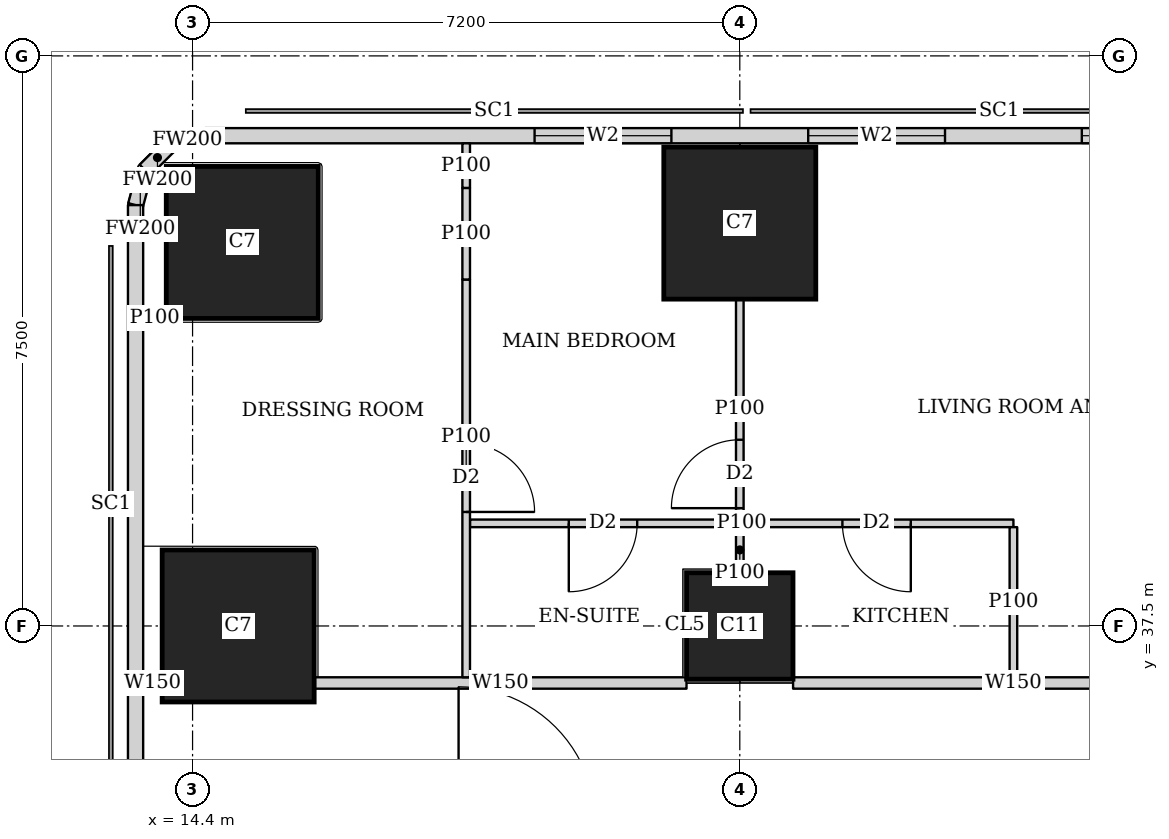
"""IFC4 building model, lengths in metres.
Left out: names, types, materials, properties, quantities, classifications, styles, units other than length and angle.
Written with IfcOpenShell. Run it as: python <this file> out.ifc"""

import sys

from ifc_helpers import new_model, si_unit, direction, frame, frame_2d, origin, origin_2d, place, context, subcontext, project, spatial, rectangle, extrude, element, fill, save


model = new_model("IFC4")
c1 = context("Model", 3, precision=1e-05, world=origin(), true_north=direction((0.0, 1.0)))
c2 = subcontext(c1, "Body", "Model", "MODEL_VIEW")
j1 = project(units=[si_unit("LENGTHUNIT", "METRE"), si_unit("PLANEANGLEUNIT", "RADIAN")], contexts=[c1])
p1 = place(None, origin())
s1 = spatial("IfcSite", under=j1, at=p1, CompositionType="ELEMENT")
p2 = place(p1, origin())
s2 = spatial("IfcBuilding", under=s1, at=p2, CompositionType="ELEMENT")
p3 = place(p2, frame((0.0, 0.0, 289.1)))
s3 = spatial("IfcBuildingStorey", under=s2, at=p3, CompositionType="ELEMENT", Elevation=289.1)
p4 = place(p3, frame((15.0, 37.5, 0.0), z_axis=(0.0, 0.0, 1.0), x_axis=(1.0, 0.0, 0.0)))
e1 = element("IfcColumn", 1, at=p4, inside=s3, PredefinedType="COLUMN", context=c2, shape_type="SweptSolid", body=[
    extrude(rectangle(XDim=2.0, YDim=2.0, at=origin_2d()), origin(), (0.0, 0.0, 1.0), 3.75),
])
p5 = place(p3, frame((21.6, 37.5, 0.0), z_axis=(0.0, 0.0, 1.0), x_axis=(1.0, 0.0, 0.0)))
e2 = element("IfcColumn", 2, at=p5, inside=s3, PredefinedType="COLUMN", context=c2, shape_type="SweptSolid", body=[
    extrude(rectangle(XDim=1.4, YDim=1.4, at=origin_2d()), origin(), (0.0, 0.0, 1.0), 3.75),
])
for number, where, z_axis, x_axis in (
    (3, (15.054, 42.546, 0.0), (0.0, 0.0, 1.0), (1.0, 0.0, 0.0)),
    (4, (21.6, 42.8, 0.0), (0.0, 0.0, 1.0), (1.0, 0.0, 0.0)),
):
    element("IfcColumn", number, at=place(p3, frame(where, z_axis=z_axis, x_axis=x_axis)), inside=s3, PredefinedType="COLUMN", context=c2, shape_type="SweptSolid", body=[
        extrude(rectangle(XDim=2.0, YDim=2.0, at=origin_2d()), origin(), (0.0, 0.0, 1.0), 3.75),
    ])
p6 = place(p3, frame((42.103, 43.95, 0.0), z_axis=(0.0, 0.0, 1.0), x_axis=(-1.0, 0.0, 0.0)))
e5 = element("IfcWall", 5, at=p6, inside=s3, PredefinedType="SOLIDWALL", context=c2, shape_type="SweptSolid", body=[
    extrude(rectangle(XDim=27.54, YDim=0.2, at=frame_2d((13.77, 0.0))), origin(), (0.0, 0.0, 1.0), 3.5),
])
p7 = place(p6, frame((10.603, 0.0, 0.9)))
e6 = element("IfcOpeningElement", 6, at=p7, cuts=e5, PredefinedType="OPENING", context=c2, shape_type="SweptSolid", body=[
    extrude(rectangle(XDim=1.8, YDim=1.5, at=frame_2d((0.9, 0.75))), frame((0.0, 0.11, 0.0), z_axis=(0.0, -1.0, 0.0), x_axis=(1.0, 0.0, 0.0)), (0.0, 0.0, 1.0), 0.22),
])
p8 = place(p6, frame((14.203, 0.0, 0.9)))
e7 = element("IfcOpeningElement", 7, at=p8, cuts=e5, PredefinedType="OPENING", context=c2, shape_type="SweptSolid", body=[
    extrude(rectangle(XDim=1.8, YDim=1.5, at=frame_2d((0.9, 0.75))), frame((0.0, 0.11, 0.0), z_axis=(0.0, -1.0, 0.0), x_axis=(1.0, 0.0, 0.0)), (0.0, 0.0, 1.0), 0.22),
])
p9 = place(p6, frame((17.803, 0.0, 0.9)))
e8 = element("IfcOpeningElement", 8, at=p9, cuts=e5, PredefinedType="OPENING", context=c2, shape_type="SweptSolid", body=[
    extrude(rectangle(XDim=1.8, YDim=1.5, at=frame_2d((0.9, 0.75))), frame((0.0, 0.11, 0.0), z_axis=(0.0, -1.0, 0.0), x_axis=(1.0, 0.0, 0.0)), (0.0, 0.0, 1.0), 0.22),
])
p10 = place(p6, frame((21.403, 0.0, 0.9)))
e9 = element("IfcOpeningElement", 9, at=p10, cuts=e5, PredefinedType="OPENING", context=c2, shape_type="SweptSolid", body=[
    extrude(rectangle(XDim=1.8, YDim=1.5, at=frame_2d((0.9, 0.75))), frame((0.0, 0.11, 0.0), z_axis=(0.0, -1.0, 0.0), x_axis=(1.0, 0.0, 0.0)), (0.0, 0.0, 1.0), 0.22),
])
p11 = place(p3, frame((14.563, 43.95, 0.0), z_axis=(0.0, 0.0, 1.0), x_axis=(-0.965655254015, -0.259826731483, 0.0)))
e10 = element("IfcWall", 10, at=p11, inside=s3, PredefinedType="SOLIDWALL", context=c2, shape_type="SweptSolid", body=[
    extrude(rectangle(XDim=0.477, YDim=0.2, at=frame_2d((0.239, 0.0))), origin(), (0.0, 0.0, 1.0), 3.5),
])
p12 = place(p3, frame((14.102, 43.826, 0.0), z_axis=(0.0, 0.0, 1.0), x_axis=(-0.707369890659, -0.706843573776, 0.0)))
e11 = element("IfcWall", 11, at=p12, inside=s3, PredefinedType="SOLIDWALL", context=c2, shape_type="SweptSolid", body=[
    extrude(rectangle(XDim=0.464, YDim=0.2, at=frame_2d((0.232, 0.0))), origin(), (0.0, 0.0, 1.0), 3.5),
])
p13 = place(p3, frame((13.774, 43.498, 0.0), z_axis=(0.0, 0.0, 1.0), x_axis=(-0.259826731483, -0.965655254015, 0.0)))
e12 = element("IfcWall", 12, at=p13, inside=s3, PredefinedType="SOLIDWALL", context=c2, shape_type="SweptSolid", body=[
    extrude(rectangle(XDim=0.477, YDim=0.2, at=frame_2d((0.239, 0.0))), origin(), (0.0, 0.0, 1.0), 3.5),
])
p14 = place(p3, frame((13.65, 43.037, 0.0), z_axis=(0.0, 0.0, 1.0), x_axis=(0.0, -1.0, 0.0)))
e13 = element("IfcWall", 13, at=p14, inside=s3, PredefinedType="SOLIDWALL", context=c2, shape_type="SweptSolid", body=[
    extrude(rectangle(XDim=35.374, YDim=0.2, at=frame_2d((17.687, 0.0))), origin(), (0.0, 0.0, 1.0), 3.5),
])
p15 = place(p3, frame((13.75, 36.75, 0.0), z_axis=(0.0, 0.0, 1.0), x_axis=(1.0, 0.0, 0.0)))
e14 = element("IfcWall", 14, at=p15, inside=s3, PredefinedType="SOLIDWALL", context=c2, shape_type="SweptSolid", body=[
    extrude(rectangle(XDim=0.249, YDim=0.15, at=frame_2d((0.125, 0.0))), origin(), (0.0, 0.0, 1.0), 3.5),
])
p16 = place(p3, frame((16.001, 36.75, 0.0), z_axis=(0.0, 0.0, 1.0), x_axis=(1.0, 0.0, 0.0)))
e15 = element("IfcWall", 15, at=p16, inside=s3, PredefinedType="SOLIDWALL", context=c2, shape_type="SweptSolid", body=[
    extrude(rectangle(XDim=4.898, YDim=0.15, at=frame_2d((2.449, 0.0))), origin(), (0.0, 0.0, 1.0), 3.5),
])
p17 = place(p3, frame((22.301, 36.75, 0.0), z_axis=(0.0, 0.0, 1.0), x_axis=(1.0, 0.0, 0.0)))
e16 = element("IfcWall", 16, at=p17, inside=s3, PredefinedType="SOLIDWALL", context=c2, shape_type="SweptSolid", body=[
    extrude(rectangle(XDim=5.798, YDim=0.15, at=frame_2d((2.899, 0.0))), origin(), (0.0, 0.0, 1.0), 3.5),
])
p18 = place(p17, frame((4.199, 0.0, 0.0)))
e17 = element("IfcOpeningElement", 17, at=p18, cuts=e16, PredefinedType="OPENING", context=c2, shape_type="SweptSolid", body=[
    extrude(rectangle(XDim=1.0, YDim=2.1, at=frame_2d((0.5, 1.05))), frame((0.0, 0.085, 0.0), z_axis=(0.0, -1.0, 0.0), x_axis=(1.0, 0.0, 0.0)), (0.0, 0.0, 1.0), 0.17),
])
p19 = place(p3, frame((14.054, 41.546, 0.0), z_axis=(0.0, 0.0, 1.0), x_axis=(-1.0, 0.0, 0.0)))
e18 = element("IfcWall", 18, at=p19, inside=s3, PredefinedType="PARTITIONING", context=c2, shape_type="SweptSolid", body=[
    extrude(rectangle(XDim=0.304, YDim=0.1, at=frame_2d((0.152, 0.0))), origin(), (0.0, 0.0, 1.0), 3.5),
])
p20 = place(p3, frame((18.0, 36.825, 0.0), z_axis=(0.0, 0.0, 1.0), x_axis=(0.0, 1.0, 0.0)))
e19 = element("IfcWall", 19, at=p20, inside=s3, PredefinedType="PARTITIONING", context=c2, shape_type="SweptSolid", body=[
    extrude(rectangle(XDim=5.233, YDim=0.1, at=frame_2d((2.617, 0.0))), origin(), (0.0, 0.0, 1.0), 3.5),
])
p21 = place(p20, frame((2.175, 0.0, 0.0)))
e20 = element("IfcOpeningElement", 20, at=p21, cuts=e19, PredefinedType="OPENING", context=c2, shape_type="SweptSolid", body=[
    extrude(rectangle(XDim=0.9, YDim=2.1, at=frame_2d((0.45, 1.05))), frame((0.0, 0.06, 0.0), z_axis=(0.0, -1.0, 0.0), x_axis=(1.0, 0.0, 0.0)), (0.0, 0.0, 1.0), 0.12),
])
p22 = place(p3, frame((18.0, 42.058, 0.0), z_axis=(0.0, 0.0, 1.0), x_axis=(0.0, 1.0, 0.0)))
e21 = element("IfcWall", 21, at=p22, inside=s3, PredefinedType="PARTITIONING", context=c2, shape_type="SweptSolid", body=[
    extrude(rectangle(XDim=1.205, YDim=0.1, at=frame_2d((0.603, 0.0))), origin(), (0.0, 0.0, 1.0), 2.05),
])
p23 = place(p3, frame((18.0, 43.263, 0.0), z_axis=(0.0, 0.0, 1.0), x_axis=(0.0, 1.0, 0.0)))
e22 = element("IfcWall", 22, at=p23, inside=s3, PredefinedType="PARTITIONING", context=c2, shape_type="SweptSolid", body=[
    extrude(rectangle(XDim=0.587, YDim=0.1, at=frame_2d((0.293, 0.0))), origin(), (0.0, 0.0, 1.0), 3.5),
])
p24 = place(p3, frame((21.6, 38.9, 0.0), z_axis=(0.0, 0.0, 1.0), x_axis=(0.0, 1.0, 0.0)))
e23 = element("IfcWall", 23, at=p24, inside=s3, PredefinedType="PARTITIONING", context=c2, shape_type="SweptSolid", body=[
    extrude(rectangle(XDim=2.899, YDim=0.1, at=frame_2d((1.45, 0.0))), origin(), (0.0, 0.0, 1.0), 3.5),
])
p25 = place(p24, frame((0.15, 0.0, 0.0)))
e24 = element("IfcOpeningElement", 24, at=p25, cuts=e23, PredefinedType="OPENING", context=c2, shape_type="SweptSolid", body=[
    extrude(rectangle(XDim=0.9, YDim=2.1, at=frame_2d((0.45, 1.05))), frame((0.0, 0.06, 0.0), z_axis=(0.0, -1.0, 0.0), x_axis=(1.0, 0.0, 0.0)), (0.0, 0.0, 1.0), 0.12),
])
p26 = place(p3, frame((21.6, 38.201, 0.0), z_axis=(0.0, 0.0, 1.0), x_axis=(0.0, 1.0, 0.0)))
e25 = element("IfcWall", 25, at=p26, inside=s3, PredefinedType="PARTITIONING", context=c2, shape_type="SweptSolid", body=[
    extrude(rectangle(XDim=0.599, YDim=0.1, at=frame_2d((0.3, 0.0))), origin(), (0.0, 0.0, 1.0), 3.5),
])
p27 = place(p3, frame((25.2, 36.825, 0.0), z_axis=(0.0, 0.0, 1.0), x_axis=(0.0, 1.0, 0.0)))
e26 = element("IfcWall", 26, at=p27, inside=s3, PredefinedType="PARTITIONING", context=c2, shape_type="SweptSolid", body=[
    extrude(rectangle(XDim=1.975, YDim=0.1, at=frame_2d((0.988, 0.0))), origin(), (0.0, 0.0, 1.0), 3.5),
])
p28 = place(p3, frame((18.05, 38.85, 0.0), z_axis=(0.0, 0.0, 1.0), x_axis=(1.0, 0.0, 0.0)))
e27 = element("IfcWall", 27, at=p28, inside=s3, PredefinedType="PARTITIONING", context=c2, shape_type="SweptSolid", body=[
    extrude(rectangle(XDim=7.15, YDim=0.1, at=frame_2d((3.575, 0.0))), origin(), (0.0, 0.0, 1.0), 3.5),
])
p29 = place(p28, frame((1.3, 0.0, 0.0)))
e28 = element("IfcOpeningElement", 28, at=p29, cuts=e27, PredefinedType="OPENING", context=c2, shape_type="SweptSolid", body=[
    extrude(rectangle(XDim=0.9, YDim=2.1, at=frame_2d((0.45, 1.05))), frame((0.0, 0.06, 0.0), z_axis=(0.0, -1.0, 0.0), x_axis=(1.0, 0.0, 0.0)), (0.0, 0.0, 1.0), 0.12),
])
p30 = place(p28, frame((4.9, 0.0, 0.0)))
e29 = element("IfcOpeningElement", 29, at=p30, cuts=e27, PredefinedType="OPENING", context=c2, shape_type="SweptSolid", body=[
    extrude(rectangle(XDim=0.9, YDim=2.1, at=frame_2d((0.45, 1.05))), frame((0.0, 0.06, 0.0), z_axis=(0.0, -1.0, 0.0), x_axis=(1.0, 0.0, 0.0)), (0.0, 0.0, 1.0), 0.12),
])
p31 = place(p8, origin())
e30 = element("IfcWindow", 30, at=p31, inside=s3, PartitioningType="SINGLE_PANEL", PredefinedType="WINDOW", context=c2, shape_type="SweptSolid", body=[
    extrude(rectangle(XDim=1.8, YDim=1.5, at=frame_2d((0.9, 0.75))), frame((0.0, 0.03, 0.0), z_axis=(0.0, -1.0, 0.0), x_axis=(1.0, 0.0, 0.0)), (0.0, 0.0, 1.0), 0.06),
])
fill(e7, e30)
p32 = place(p9, origin())
e31 = element("IfcWindow", 31, at=p32, inside=s3, PartitioningType="SINGLE_PANEL", PredefinedType="WINDOW", context=c2, shape_type="SweptSolid", body=[
    extrude(rectangle(XDim=1.8, YDim=1.5, at=frame_2d((0.9, 0.75))), frame((0.0, 0.03, 0.0), z_axis=(0.0, -1.0, 0.0), x_axis=(1.0, 0.0, 0.0)), (0.0, 0.0, 1.0), 0.06),
])
fill(e8, e31)
p33 = place(p10, origin())
e32 = element("IfcWindow", 32, at=p33, inside=s3, PartitioningType="SINGLE_PANEL", PredefinedType="WINDOW", context=c2, shape_type="SweptSolid", body=[
    extrude(rectangle(XDim=1.8, YDim=1.5, at=frame_2d((0.9, 0.75))), frame((0.0, 0.03, 0.0), z_axis=(0.0, -1.0, 0.0), x_axis=(1.0, 0.0, 0.0)), (0.0, 0.0, 1.0), 0.06),
])
fill(e9, e32)
p34 = place(p25, origin())
e33 = element("IfcDoor", 33, at=p34, inside=s3, OperationType="SINGLE_SWING_LEFT", PredefinedType="DOOR", context=c2, shape_type="SweptSolid", body=[
    extrude(rectangle(XDim=0.9, YDim=2.1, at=frame_2d((0.45, 1.05))), frame((0.0, 0.025, 0.0), z_axis=(0.0, -1.0, 0.0), x_axis=(1.0, 0.0, 0.0)), (0.0, 0.0, 1.0), 0.05),
])
fill(e24, e33)
p35 = place(p21, origin())
e34 = element("IfcDoor", 34, at=p35, inside=s3, OperationType="SINGLE_SWING_RIGHT", PredefinedType="DOOR", context=c2, shape_type="SweptSolid", body=[
    extrude(rectangle(XDim=0.9, YDim=2.1, at=frame_2d((0.45, 1.05))), frame((0.0, 0.025, 0.0), z_axis=(0.0, -1.0, 0.0), x_axis=(1.0, 0.0, 0.0)), (0.0, 0.0, 1.0), 0.05),
])
fill(e20, e34)
p36 = place(p29, origin())
e35 = element("IfcDoor", 35, at=p36, inside=s3, OperationType="SINGLE_SWING_RIGHT", PredefinedType="DOOR", context=c2, shape_type="SweptSolid", body=[
    extrude(rectangle(XDim=0.9, YDim=2.1, at=frame_2d((0.45, 1.05))), frame((0.0, 0.025, 0.0), z_axis=(0.0, -1.0, 0.0), x_axis=(1.0, 0.0, 0.0)), (0.0, 0.0, 1.0), 0.05),
])
fill(e28, e35)
p37 = place(p30, origin())
e36 = element("IfcDoor", 36, at=p37, inside=s3, OperationType="SINGLE_SWING_LEFT", PredefinedType="DOOR", context=c2, shape_type="SweptSolid", body=[
    extrude(rectangle(XDim=0.9, YDim=2.1, at=frame_2d((0.45, 1.05))), frame((0.0, 0.025, 0.0), z_axis=(0.0, -1.0, 0.0), x_axis=(1.0, 0.0, 0.0)), (0.0, 0.0, 1.0), 0.05),
])
fill(e29, e36)
save(model, sys.argv[1])
